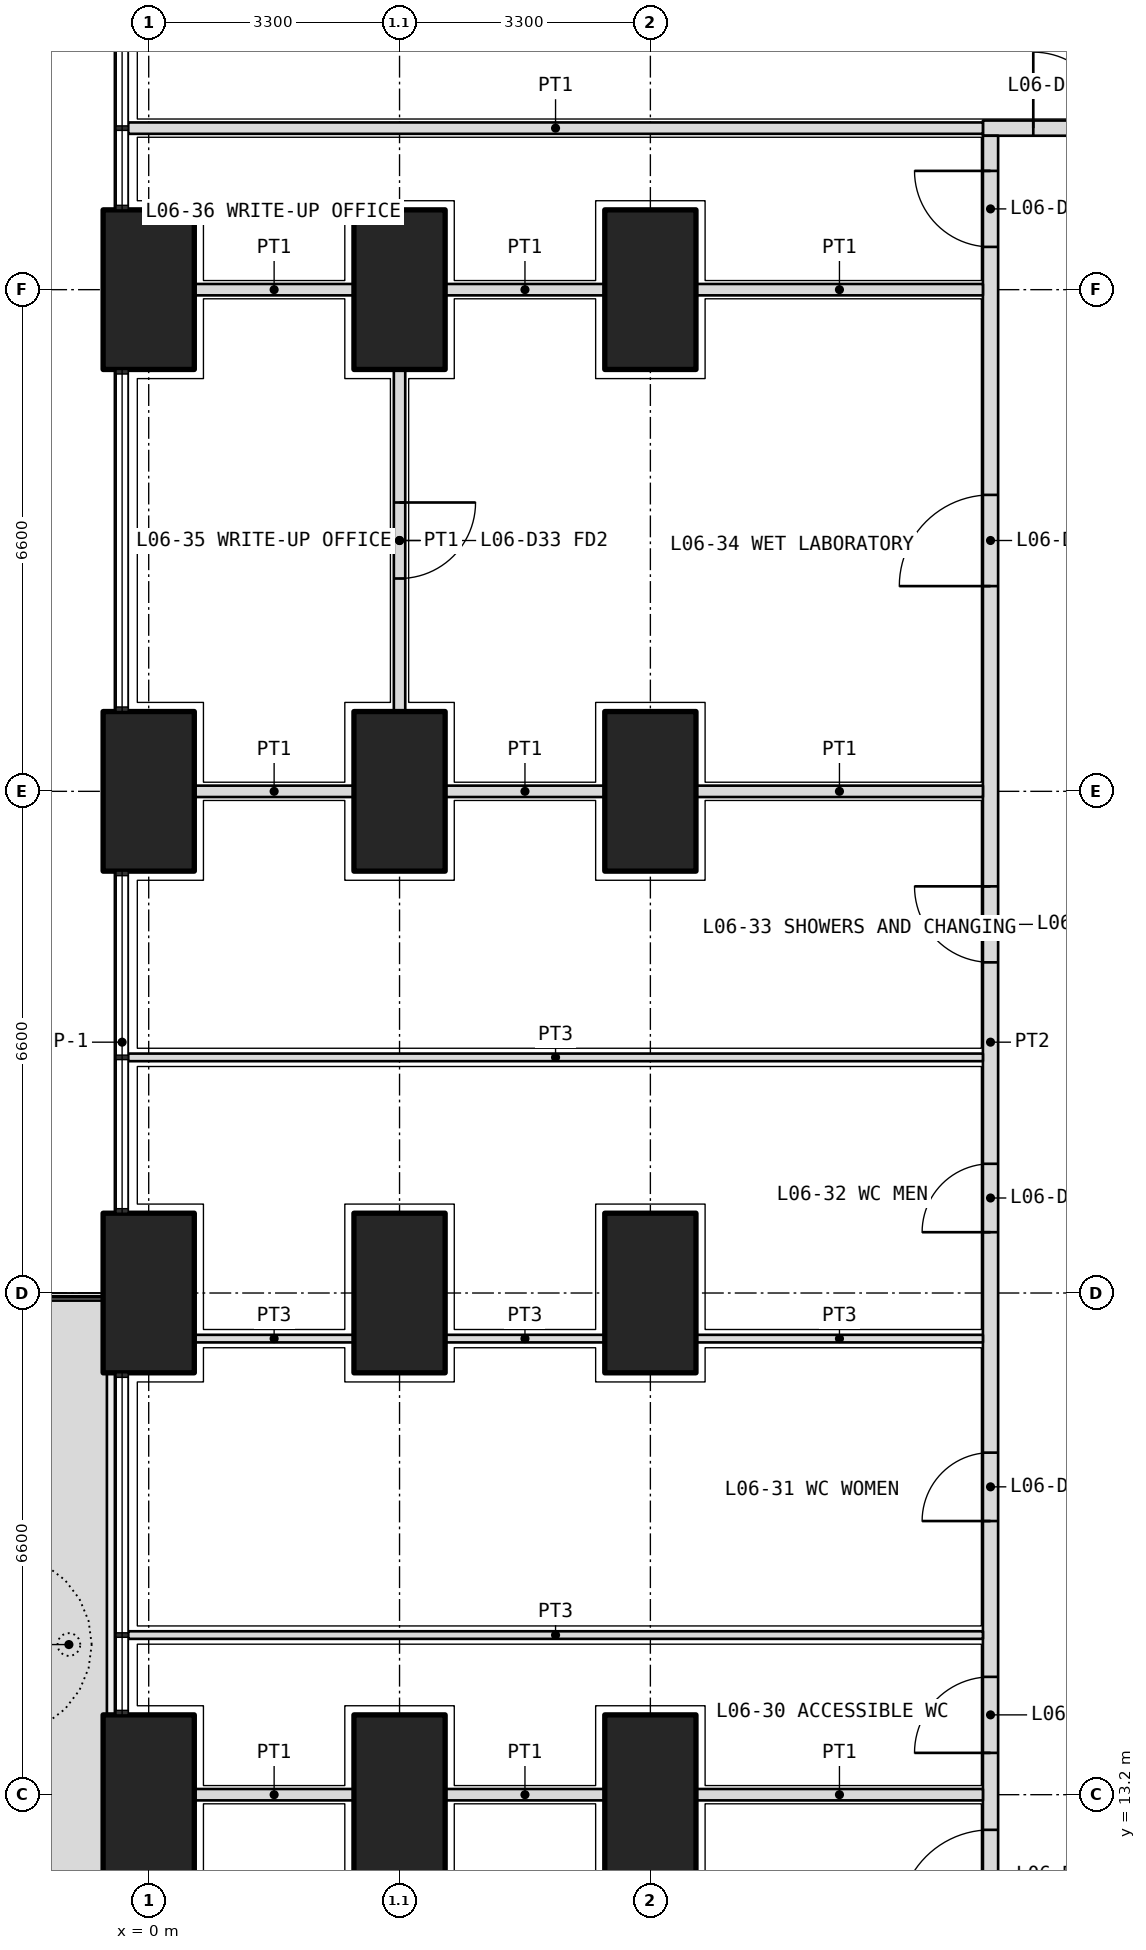
"""IFC4 building model, lengths in metres.
Left out: names, types, materials, properties, quantities, classifications, styles, units other than length and angle.
Written with IfcOpenShell. Run it as: python <this file> out.ifc"""

import sys

from ifc_helpers import new_model, si_unit, direction, frame, frame_2d, origin, origin_2d, place, context, subcontext, project, spatial, polyline, rectangle, outline, extrude, element, fill, save


model = new_model("IFC4")
c1 = context("Model", 3, precision=1e-05, world=origin(), true_north=direction((0.0, 1.0)))
c2 = subcontext(c1, "Body", "Model", "MODEL_VIEW")
j1 = project(units=[si_unit("LENGTHUNIT", "METRE"), si_unit("PLANEANGLEUNIT", "RADIAN")], contexts=[c1])
p1 = place(None, origin())
s1 = spatial("IfcSite", under=j1, at=p1, CompositionType="ELEMENT")
p2 = place(p1, origin())
s2 = spatial("IfcBuilding", under=s1, at=p2, CompositionType="ELEMENT")
p3 = place(p2, frame((0.0, 0.0, 29.7)))
s3 = spatial("IfcBuildingStorey", under=s2, at=p3, CompositionType="ELEMENT", Elevation=29.7)
for number, where, z_axis, x_axis in (
    (1, (0.0, 13.2, 0.0), (0.0, 0.0, 1.0), (0.0, 1.0, 0.0)),
    (2, (0.0, 19.8, 0.0), (0.0, 0.0, 1.0), (0.0, 1.0, 0.0)),
    (3, (0.0, 26.4, 0.0), (0.0, 0.0, 1.0), (0.0, 1.0, 0.0)),
    (4, (0.0, 33.0, 0.0), (0.0, 0.0, 1.0), (0.0, 1.0, 0.0)),
    (5, (3.3, 13.2, 0.0), (0.0, 0.0, 1.0), (0.0, 1.0, 0.0)),
    (6, (3.3, 19.8, 0.0), (0.0, 0.0, 1.0), (0.0, 1.0, 0.0)),
    (7, (3.3, 26.4, 0.0), (0.0, 0.0, 1.0), (0.0, 1.0, 0.0)),
    (8, (3.3, 33.0, 0.0), (0.0, 0.0, 1.0), (0.0, 1.0, 0.0)),
    (9, (6.6, 13.2, 0.0), (0.0, 0.0, 1.0), (0.0, 1.0, 0.0)),
    (10, (6.6, 19.8, 0.0), (0.0, 0.0, 1.0), (0.0, 1.0, 0.0)),
    (11, (6.6, 26.4, 0.0), (0.0, 0.0, 1.0), (0.0, 1.0, 0.0)),
    (12, (6.6, 33.0, 0.0), (0.0, 0.0, 1.0), (0.0, 1.0, 0.0)),
):
    element("IfcColumn", number, at=place(p3, frame(where, z_axis=z_axis, x_axis=x_axis)), inside=s3, PredefinedType="COLUMN", context=c2, shape_type="SweptSolid", body=[
        extrude(rectangle(XDim=2.1, YDim=1.2, at=origin_2d()), origin(), (0.0, 0.0, 1.0), 4.2),
    ])
p4 = place(p3, origin())
e13 = element("IfcWall", 13, at=p4, inside=s3, PredefinedType="USERDEFINED", context=c2, shape_type="SweptSolid", body=[
    extrude(outline(polyline([(-1.55, 10.65), (-0.55, 10.65), (-0.55, 19.7), (-1.55, 19.7), (-1.55, 10.65)]), holes=[polyline([(-1.4, 10.8), (-0.7, 10.8), (-0.7, 19.55), (-1.4, 19.55), (-1.4, 10.8)])]), origin(), (0.0, 0.0, 1.0), 1.05),
])
p5 = place(p3, frame((10.975, 35.125, 0.0), z_axis=(0.0, 0.0, 1.0), x_axis=(1.0, 0.0, 0.0)))
e14 = element("IfcWall", 14, at=p5, inside=s3, PredefinedType="PARTITIONING", context=c2, shape_type="SweptSolid", body=[
    extrude(rectangle(XDim=30.85, YDim=0.2, at=frame_2d((15.425, 0.0))), origin(), (0.0, 0.0, 1.0), 2.85),
])
p6 = place(p5, frame((0.663, 0.0, 0.0)))
e15 = element("IfcOpeningElement", 15, at=p6, cuts=e14, PredefinedType="OPENING", context=c2, shape_type="SweptSolid", body=[
    extrude(rectangle(XDim=1.0, YDim=2.1, at=frame_2d((0.5, 1.05))), frame((0.0, 0.11, 0.0), z_axis=(0.0, -1.0, 0.0), x_axis=(1.0, 0.0, 0.0)), (0.0, 0.0, 1.0), 0.22),
])
p7 = place(p5, frame((4.925, 0.0, 0.0)))
e16 = element("IfcOpeningElement", 16, at=p7, cuts=e14, PredefinedType="OPENING", context=c2, shape_type="SweptSolid", body=[
    extrude(rectangle(XDim=1.2, YDim=2.1, at=frame_2d((0.6, 1.05))), frame((0.0, 0.11, 0.0), z_axis=(0.0, -1.0, 0.0), x_axis=(1.0, 0.0, 0.0)), (0.0, 0.0, 1.0), 0.22),
])
p8 = place(p5, frame((9.975, 0.0, 0.0)))
e17 = element("IfcOpeningElement", 17, at=p8, cuts=e14, PredefinedType="OPENING", context=c2, shape_type="SweptSolid", body=[
    extrude(rectangle(XDim=1.0, YDim=2.1, at=frame_2d((0.5, 1.05))), frame((0.0, 0.11, 0.0), z_axis=(0.0, -1.0, 0.0), x_axis=(1.0, 0.0, 0.0)), (0.0, 0.0, 1.0), 0.22),
])
p9 = place(p5, frame((13.725, 0.0, 0.0)))
e18 = element("IfcOpeningElement", 18, at=p9, cuts=e14, PredefinedType="OPENING", context=c2, shape_type="SweptSolid", body=[
    extrude(rectangle(XDim=1.0, YDim=2.1, at=frame_2d((0.5, 1.05))), frame((0.0, 0.11, 0.0), z_axis=(0.0, -1.0, 0.0), x_axis=(1.0, 0.0, 0.0)), (0.0, 0.0, 1.0), 0.22),
])
p10 = place(p5, frame((17.025, 0.0, 0.0)))
e19 = element("IfcOpeningElement", 19, at=p10, cuts=e14, PredefinedType="OPENING", context=c2, shape_type="SweptSolid", body=[
    extrude(rectangle(XDim=1.0, YDim=2.1, at=frame_2d((0.5, 1.05))), frame((0.0, 0.11, 0.0), z_axis=(0.0, -1.0, 0.0), x_axis=(1.0, 0.0, 0.0)), (0.0, 0.0, 1.0), 0.22),
])
p11 = place(p5, frame((24.137, 0.0, 0.0)))
e20 = element("IfcOpeningElement", 20, at=p11, cuts=e14, PredefinedType="OPENING", context=c2, shape_type="SweptSolid", body=[
    extrude(rectangle(XDim=1.2, YDim=2.1, at=frame_2d((0.6, 1.05))), frame((0.0, 0.11, 0.0), z_axis=(0.0, -1.0, 0.0), x_axis=(1.0, 0.0, 0.0)), (0.0, 0.0, 1.0), 0.22),
])
p12 = place(p3, frame((11.075, 11.175, 0.0), z_axis=(0.0, 0.0, 1.0), x_axis=(0.0, 1.0, 0.0)))
e21 = element("IfcWall", 21, at=p12, inside=s3, PredefinedType="PARTITIONING", context=c2, shape_type="SweptSolid", body=[
    extrude(rectangle(XDim=23.85, YDim=0.2, at=frame_2d((11.925, 0.0))), origin(), (0.0, 0.0, 1.0), 2.85),
])
p13 = place(p12, frame((0.363, 0.0, 0.0)))
e22 = element("IfcOpeningElement", 22, at=p13, cuts=e21, PredefinedType="OPENING", context=c2, shape_type="SweptSolid", body=[
    extrude(rectangle(XDim=1.2, YDim=2.1, at=frame_2d((0.6, 1.05))), frame((0.0, 0.11, 0.0), z_axis=(0.0, -1.0, 0.0), x_axis=(1.0, 0.0, 0.0)), (0.0, 0.0, 1.0), 0.22),
])
p14 = place(p12, frame((2.575, 0.0, 0.0)))
e23 = element("IfcOpeningElement", 23, at=p14, cuts=e21, PredefinedType="OPENING", context=c2, shape_type="SweptSolid", body=[
    extrude(rectangle(XDim=1.0, YDim=2.1, at=frame_2d((0.5, 1.05))), frame((0.0, 0.11, 0.0), z_axis=(0.0, -1.0, 0.0), x_axis=(1.0, 0.0, 0.0)), (0.0, 0.0, 1.0), 0.22),
])
p15 = place(p12, frame((5.625, 0.0, 0.0)))
e24 = element("IfcOpeningElement", 24, at=p15, cuts=e21, PredefinedType="OPENING", context=c2, shape_type="SweptSolid", body=[
    extrude(rectangle(XDim=0.9, YDim=2.1, at=frame_2d((0.45, 1.05))), frame((0.0, 0.11, 0.0), z_axis=(0.0, -1.0, 0.0), x_axis=(1.0, 0.0, 0.0)), (0.0, 0.0, 1.0), 0.22),
])
p16 = place(p12, frame((9.425, 0.0, 0.0)))
e25 = element("IfcOpeningElement", 25, at=p16, cuts=e21, PredefinedType="OPENING", context=c2, shape_type="SweptSolid", body=[
    extrude(rectangle(XDim=0.9, YDim=2.1, at=frame_2d((0.45, 1.05))), frame((0.0, 0.11, 0.0), z_axis=(0.0, -1.0, 0.0), x_axis=(1.0, 0.0, 0.0)), (0.0, 0.0, 1.0), 0.22),
])
p17 = place(p12, frame((12.975, 0.0, 0.0)))
e26 = element("IfcOpeningElement", 26, at=p17, cuts=e21, PredefinedType="OPENING", context=c2, shape_type="SweptSolid", body=[
    extrude(rectangle(XDim=1.0, YDim=2.1, at=frame_2d((0.5, 1.05))), frame((0.0, 0.11, 0.0), z_axis=(0.0, -1.0, 0.0), x_axis=(1.0, 0.0, 0.0)), (0.0, 0.0, 1.0), 0.22),
])
p18 = place(p12, frame((17.925, 0.0, 0.0)))
e27 = element("IfcOpeningElement", 27, at=p18, cuts=e21, PredefinedType="OPENING", context=c2, shape_type="SweptSolid", body=[
    extrude(rectangle(XDim=1.2, YDim=2.1, at=frame_2d((0.6, 1.05))), frame((0.0, 0.11, 0.0), z_axis=(0.0, -1.0, 0.0), x_axis=(1.0, 0.0, 0.0)), (0.0, 0.0, 1.0), 0.22),
])
p19 = place(p12, frame((22.387, 0.0, 0.0)))
e28 = element("IfcOpeningElement", 28, at=p19, cuts=e21, PredefinedType="OPENING", context=c2, shape_type="SweptSolid", body=[
    extrude(rectangle(XDim=1.0, YDim=2.1, at=frame_2d((0.5, 1.05))), frame((0.0, 0.11, 0.0), z_axis=(0.0, -1.0, 0.0), x_axis=(1.0, 0.0, 0.0)), (0.0, 0.0, 1.0), 0.22),
])
p20 = place(p3, frame((-0.27, 35.125, 0.0), z_axis=(0.0, 0.0, 1.0), x_axis=(1.0, 0.0, 0.0)))
e29 = element("IfcWall", 29, at=p20, inside=s3, PredefinedType="PARTITIONING", context=c2, shape_type="SweptSolid", body=[
    extrude(rectangle(XDim=11.245, YDim=0.15, at=frame_2d((5.623, 0.0))), origin(), (0.0, 0.0, 1.0), 2.7),
])
p21 = place(p3, frame((3.3, 31.95, 0.0), z_axis=(0.0, 0.0, 1.0), x_axis=(0.0, -1.0, 0.0)))
e30 = element("IfcWall", 30, at=p21, inside=s3, PredefinedType="PARTITIONING", context=c2, shape_type="SweptSolid", body=[
    extrude(rectangle(XDim=4.5, YDim=0.15, at=frame_2d((2.25, 0.0))), origin(), (0.0, 0.0, 1.0), 3.9),
])
p22 = place(p21, frame((1.75, 0.0, 0.0)))
e31 = element("IfcOpeningElement", 31, at=p22, cuts=e30, PredefinedType="OPENING", context=c2, shape_type="SweptSolid", body=[
    extrude(rectangle(XDim=1.0, YDim=2.1, at=frame_2d((0.5, 1.05))), frame((0.0, 0.085, 0.0), z_axis=(0.0, -1.0, 0.0), x_axis=(1.0, 0.0, 0.0)), (0.0, 0.0, 1.0), 0.17),
])
p23 = place(p3, frame((-0.27, 15.3, 0.0), z_axis=(0.0, 0.0, 1.0), x_axis=(1.0, 0.0, 0.0)))
e32 = element("IfcWall", 32, at=p23, inside=s3, PredefinedType="PARTITIONING", context=c2, shape_type="SweptSolid", body=[
    extrude(rectangle(XDim=11.245, YDim=0.1, at=frame_2d((5.623, 0.0))), origin(), (0.0, 0.0, 1.0), 2.7),
])
p24 = place(p3, frame((0.6, 19.2, 0.0), z_axis=(0.0, 0.0, 1.0), x_axis=(1.0, 0.0, 0.0)))
e33 = element("IfcWall", 33, at=p24, inside=s3, PredefinedType="PARTITIONING", context=c2, shape_type="SweptSolid", body=[
    extrude(rectangle(XDim=2.1, YDim=0.1, at=frame_2d((1.05, 0.0))), origin(), (0.0, 0.0, 1.0), 2.85),
])
p25 = place(p3, frame((3.9, 19.2, 0.0), z_axis=(0.0, 0.0, 1.0), x_axis=(1.0, 0.0, 0.0)))
e34 = element("IfcWall", 34, at=p25, inside=s3, PredefinedType="PARTITIONING", context=c2, shape_type="SweptSolid", body=[
    extrude(rectangle(XDim=2.1, YDim=0.1, at=frame_2d((1.05, 0.0))), origin(), (0.0, 0.0, 1.0), 2.85),
])
p26 = place(p3, frame((7.2, 19.2, 0.0), z_axis=(0.0, 0.0, 1.0), x_axis=(1.0, 0.0, 0.0)))
e35 = element("IfcWall", 35, at=p26, inside=s3, PredefinedType="PARTITIONING", context=c2, shape_type="SweptSolid", body=[
    extrude(rectangle(XDim=3.775, YDim=0.1, at=frame_2d((1.888, 0.0))), origin(), (0.0, 0.0, 1.0), 2.85),
])
p27 = place(p3, frame((-0.27, 22.9, 0.0), z_axis=(0.0, 0.0, 1.0), x_axis=(1.0, 0.0, 0.0)))
e36 = element("IfcWall", 36, at=p27, inside=s3, PredefinedType="PARTITIONING", context=c2, shape_type="SweptSolid", body=[
    extrude(rectangle(XDim=11.245, YDim=0.1, at=frame_2d((5.623, 0.0))), origin(), (0.0, 0.0, 1.0), 2.7),
])
p28 = place(p3, frame((0.6, 13.2, 0.0), z_axis=(0.0, 0.0, 1.0), x_axis=(1.0, 0.0, 0.0)))
e37 = element("IfcWall", 37, at=p28, inside=s3, PredefinedType="PARTITIONING", context=c2, shape_type="SweptSolid", body=[
    extrude(rectangle(XDim=2.1, YDim=0.15, at=frame_2d((1.05, 0.0))), origin(), (0.0, 0.0, 1.0), 2.85),
])
p29 = place(p3, frame((3.9, 13.2, 0.0), z_axis=(0.0, 0.0, 1.0), x_axis=(1.0, 0.0, 0.0)))
e38 = element("IfcWall", 38, at=p29, inside=s3, PredefinedType="PARTITIONING", context=c2, shape_type="SweptSolid", body=[
    extrude(rectangle(XDim=2.1, YDim=0.15, at=frame_2d((1.05, 0.0))), origin(), (0.0, 0.0, 1.0), 2.85),
])
p30 = place(p3, frame((7.2, 13.2, 0.0), z_axis=(0.0, 0.0, 1.0), x_axis=(1.0, 0.0, 0.0)))
e39 = element("IfcWall", 39, at=p30, inside=s3, PredefinedType="PARTITIONING", context=c2, shape_type="SweptSolid", body=[
    extrude(rectangle(XDim=3.775, YDim=0.15, at=frame_2d((1.888, 0.0))), origin(), (0.0, 0.0, 1.0), 2.85),
])
p31 = place(p3, frame((0.6, 26.4, 0.0), z_axis=(0.0, 0.0, 1.0), x_axis=(1.0, 0.0, 0.0)))
e40 = element("IfcWall", 40, at=p31, inside=s3, PredefinedType="PARTITIONING", context=c2, shape_type="SweptSolid", body=[
    extrude(rectangle(XDim=2.1, YDim=0.15, at=frame_2d((1.05, 0.0))), origin(), (0.0, 0.0, 1.0), 2.85),
])
p32 = place(p3, frame((3.9, 26.4, 0.0), z_axis=(0.0, 0.0, 1.0), x_axis=(1.0, 0.0, 0.0)))
e41 = element("IfcWall", 41, at=p32, inside=s3, PredefinedType="PARTITIONING", context=c2, shape_type="SweptSolid", body=[
    extrude(rectangle(XDim=2.1, YDim=0.15, at=frame_2d((1.05, 0.0))), origin(), (0.0, 0.0, 1.0), 2.85),
])
p33 = place(p3, frame((7.2, 26.4, 0.0), z_axis=(0.0, 0.0, 1.0), x_axis=(1.0, 0.0, 0.0)))
e42 = element("IfcWall", 42, at=p33, inside=s3, PredefinedType="PARTITIONING", context=c2, shape_type="SweptSolid", body=[
    extrude(rectangle(XDim=3.775, YDim=0.15, at=frame_2d((1.888, 0.0))), origin(), (0.0, 0.0, 1.0), 2.85),
])
p34 = place(p3, frame((0.6, 33.0, 0.0), z_axis=(0.0, 0.0, 1.0), x_axis=(1.0, 0.0, 0.0)))
e43 = element("IfcWall", 43, at=p34, inside=s3, PredefinedType="PARTITIONING", context=c2, shape_type="SweptSolid", body=[
    extrude(rectangle(XDim=2.1, YDim=0.15, at=frame_2d((1.05, 0.0))), origin(), (0.0, 0.0, 1.0), 2.85),
])
p35 = place(p3, frame((3.9, 33.0, 0.0), z_axis=(0.0, 0.0, 1.0), x_axis=(1.0, 0.0, 0.0)))
e44 = element("IfcWall", 44, at=p35, inside=s3, PredefinedType="PARTITIONING", context=c2, shape_type="SweptSolid", body=[
    extrude(rectangle(XDim=2.1, YDim=0.15, at=frame_2d((1.05, 0.0))), origin(), (0.0, 0.0, 1.0), 2.85),
])
p36 = place(p3, frame((7.2, 33.0, 0.0), z_axis=(0.0, 0.0, 1.0), x_axis=(1.0, 0.0, 0.0)))
e45 = element("IfcWall", 45, at=p36, inside=s3, PredefinedType="PARTITIONING", context=c2, shape_type="SweptSolid", body=[
    extrude(rectangle(XDim=3.775, YDim=0.15, at=frame_2d((1.888, 0.0))), origin(), (0.0, 0.0, 1.0), 2.85),
])
p37 = place(p6, origin())
e46 = element("IfcDoor", 46, at=p37, inside=s3, OperationType="SINGLE_SWING_LEFT", PredefinedType="DOOR", context=c2, shape_type="SweptSolid", body=[
    extrude(rectangle(XDim=1.0, YDim=2.1, at=frame_2d((0.5, 1.05))), frame((0.0, 0.025, 0.0), z_axis=(0.0, -1.0, 0.0), x_axis=(1.0, 0.0, 0.0)), (0.0, 0.0, 1.0), 0.05),
])
fill(e15, e46)
p38 = place(p13, origin())
e47 = element("IfcDoor", 47, at=p38, inside=s3, OperationType="DOUBLE_DOOR_SINGLE_SWING", PredefinedType="DOOR", context=c2, shape_type="SweptSolid", body=[
    extrude(rectangle(XDim=1.2, YDim=2.1, at=frame_2d((0.6, 1.05))), frame((0.0, 0.025, 0.0), z_axis=(0.0, -1.0, 0.0), x_axis=(1.0, 0.0, 0.0)), (0.0, 0.0, 1.0), 0.05),
])
fill(e22, e47)
p39 = place(p14, origin())
e48 = element("IfcDoor", 48, at=p39, inside=s3, OperationType="SINGLE_SWING_LEFT", PredefinedType="DOOR", context=c2, shape_type="SweptSolid", body=[
    extrude(rectangle(XDim=1.0, YDim=2.1, at=frame_2d((0.5, 1.05))), frame((0.0, 0.025, 0.0), z_axis=(0.0, -1.0, 0.0), x_axis=(1.0, 0.0, 0.0)), (0.0, 0.0, 1.0), 0.05),
])
fill(e23, e48)
p40 = place(p15, origin())
e49 = element("IfcDoor", 49, at=p40, inside=s3, OperationType="SINGLE_SWING_LEFT", PredefinedType="DOOR", context=c2, shape_type="SweptSolid", body=[
    extrude(rectangle(XDim=0.9, YDim=2.1, at=frame_2d((0.45, 1.05))), frame((0.0, 0.025, 0.0), z_axis=(0.0, -1.0, 0.0), x_axis=(1.0, 0.0, 0.0)), (0.0, 0.0, 1.0), 0.05),
])
fill(e24, e49)
p41 = place(p16, origin())
e50 = element("IfcDoor", 50, at=p41, inside=s3, OperationType="SINGLE_SWING_LEFT", PredefinedType="DOOR", context=c2, shape_type="SweptSolid", body=[
    extrude(rectangle(XDim=0.9, YDim=2.1, at=frame_2d((0.45, 1.05))), frame((0.0, 0.025, 0.0), z_axis=(0.0, -1.0, 0.0), x_axis=(1.0, 0.0, 0.0)), (0.0, 0.0, 1.0), 0.05),
])
fill(e25, e50)
p42 = place(p17, origin())
e51 = element("IfcDoor", 51, at=p42, inside=s3, OperationType="SINGLE_SWING_RIGHT", PredefinedType="DOOR", context=c2, shape_type="SweptSolid", body=[
    extrude(rectangle(XDim=1.0, YDim=2.1, at=frame_2d((0.5, 1.05))), frame((0.0, 0.025, 0.0), z_axis=(0.0, -1.0, 0.0), x_axis=(1.0, 0.0, 0.0)), (0.0, 0.0, 1.0), 0.05),
])
fill(e26, e51)
p43 = place(p18, origin())
e52 = element("IfcDoor", 52, at=p43, inside=s3, OperationType="DOUBLE_DOOR_SINGLE_SWING", PredefinedType="DOOR", context=c2, shape_type="SweptSolid", body=[
    extrude(rectangle(XDim=1.2, YDim=2.1, at=frame_2d((0.6, 1.05))), frame((0.0, 0.025, 0.0), z_axis=(0.0, -1.0, 0.0), x_axis=(1.0, 0.0, 0.0)), (0.0, 0.0, 1.0), 0.05),
])
fill(e27, e52)
p44 = place(p22, origin())
e53 = element("IfcDoor", 53, at=p44, inside=s3, OperationType="SINGLE_SWING_LEFT", PredefinedType="DOOR", context=c2, shape_type="SweptSolid", body=[
    extrude(rectangle(XDim=1.0, YDim=2.1, at=frame_2d((0.5, 1.05))), frame((0.0, 0.025, 0.0), z_axis=(0.0, -1.0, 0.0), x_axis=(1.0, 0.0, 0.0)), (0.0, 0.0, 1.0), 0.05),
])
fill(e31, e53)
p45 = place(p19, origin())
e54 = element("IfcDoor", 54, at=p45, inside=s3, OperationType="SINGLE_SWING_RIGHT", PredefinedType="DOOR", context=c2, shape_type="SweptSolid", body=[
    extrude(rectangle(XDim=1.0, YDim=2.1, at=frame_2d((0.5, 1.05))), frame((0.0, 0.025, 0.0), z_axis=(0.0, -1.0, 0.0), x_axis=(1.0, 0.0, 0.0)), (0.0, 0.0, 1.0), 0.05),
])
fill(e28, e54)
save(model, sys.argv[1])
